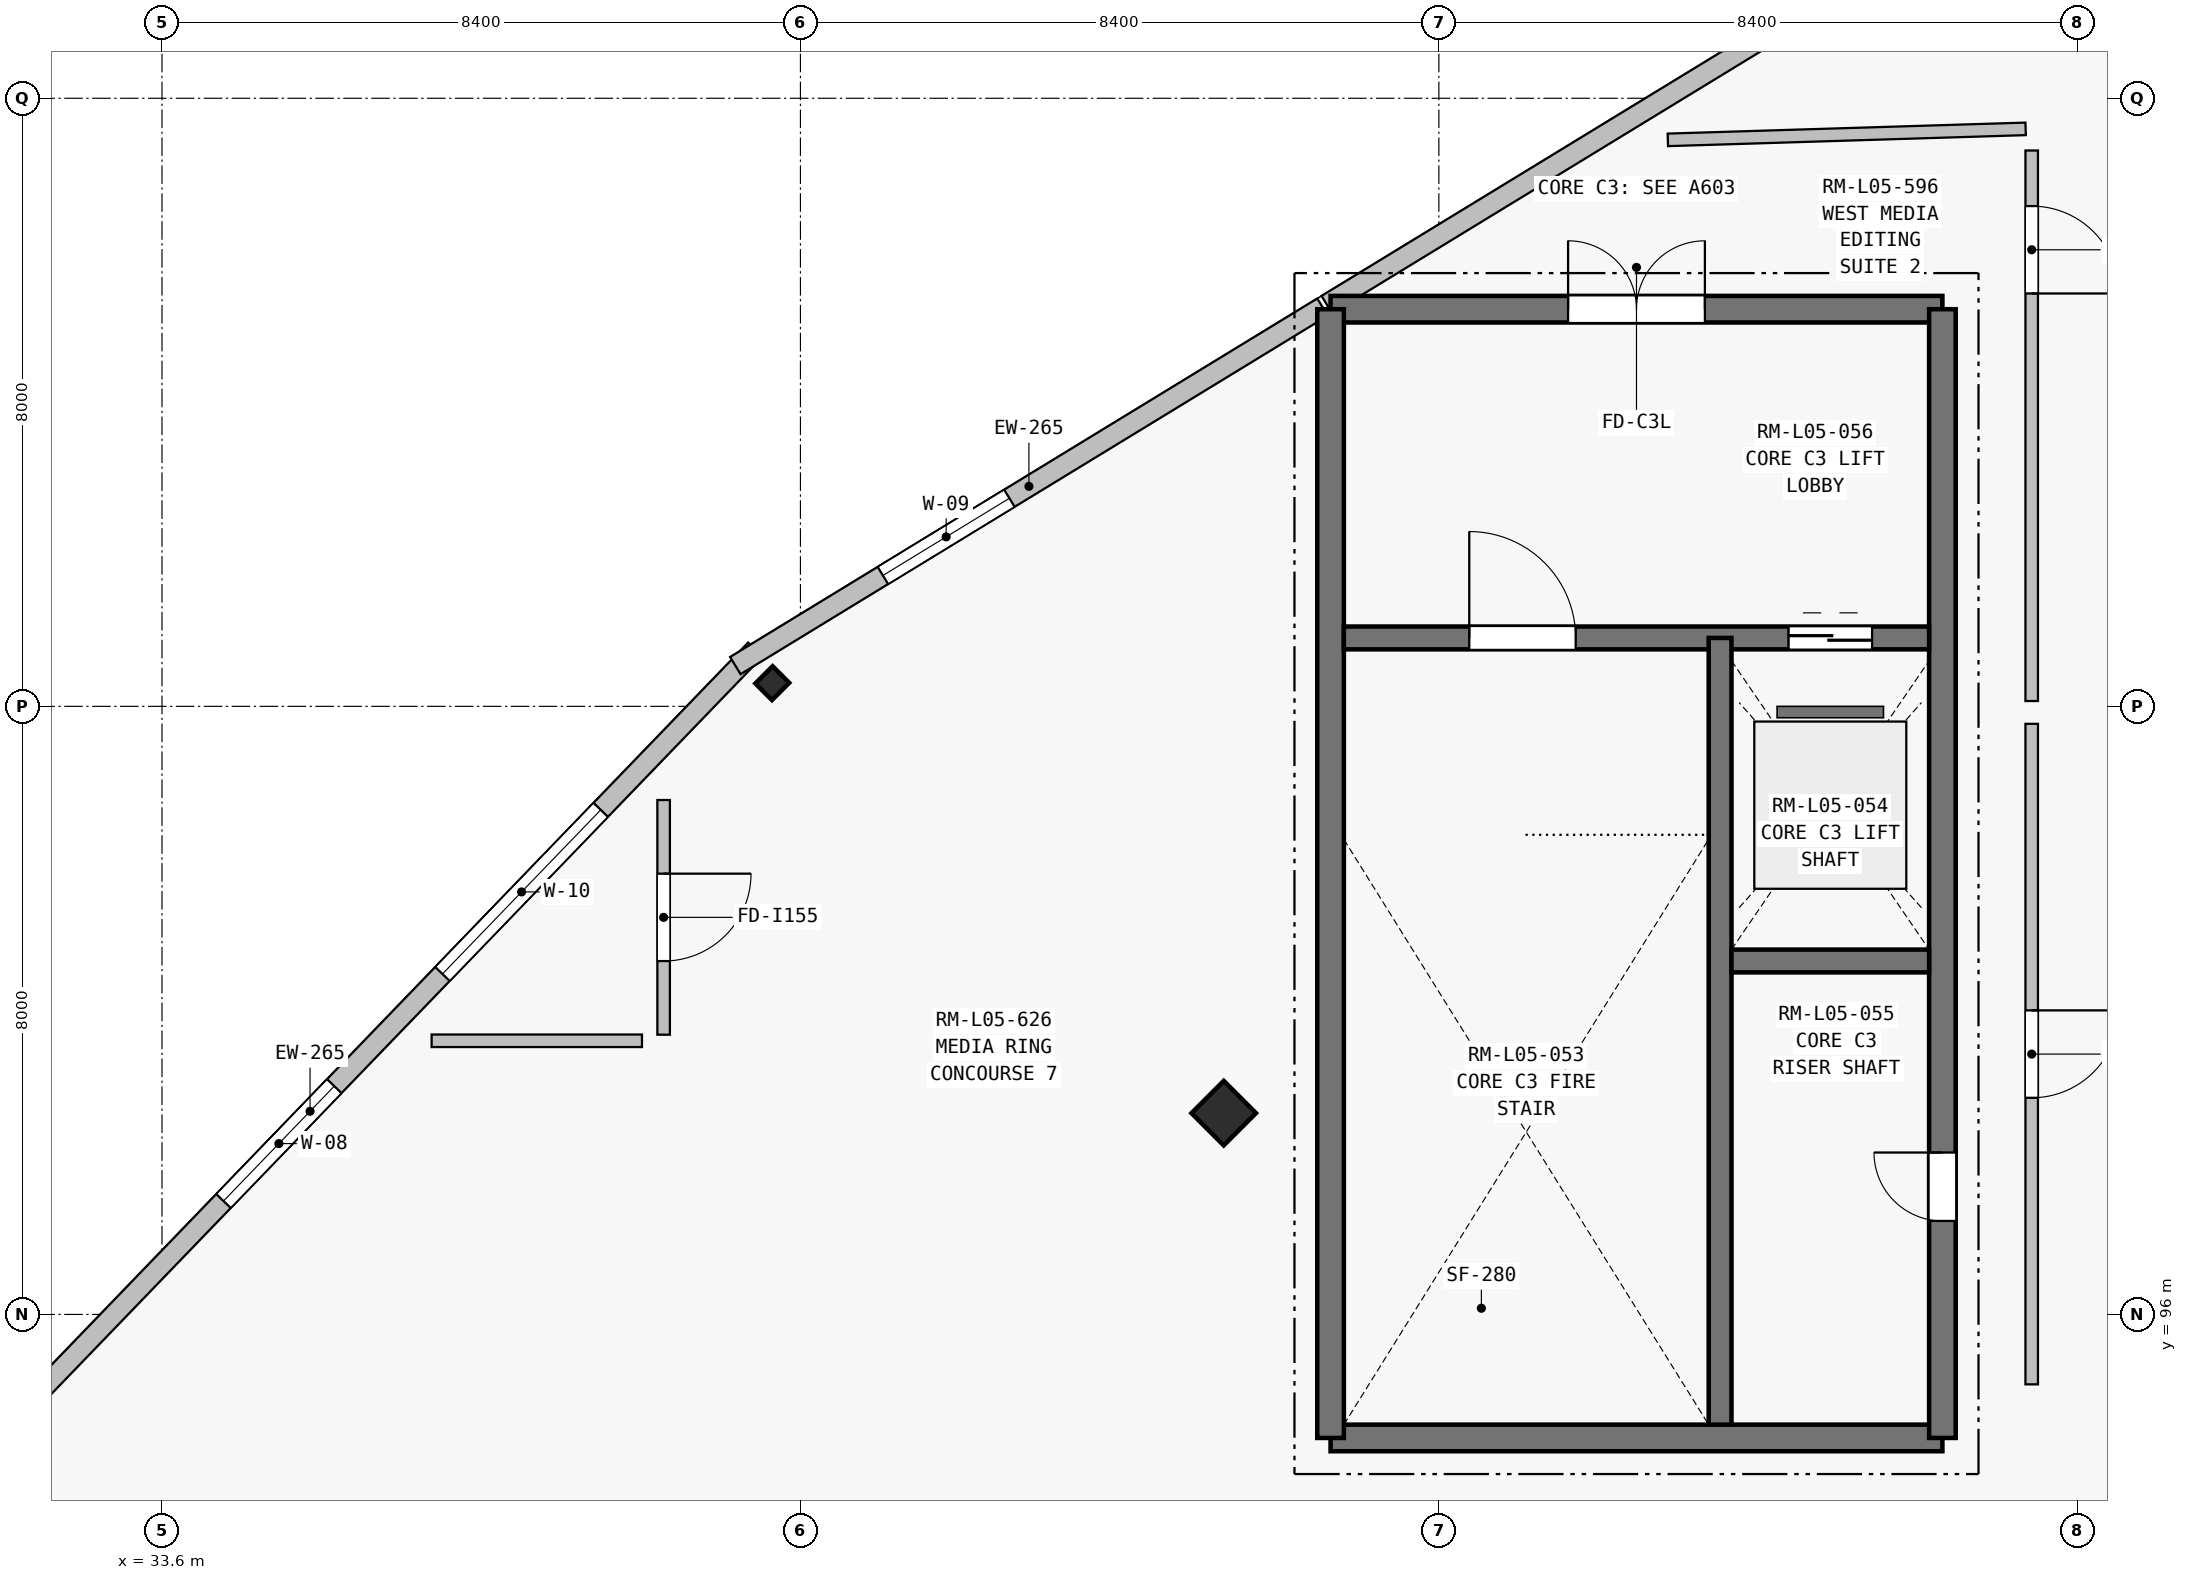
"""IFC4 building model, lengths in metres.
Left out: names, types, materials, properties, quantities, classifications, styles, units other than length and angle.
Written with IfcOpenShell. Run it as: python <this file> out.ifc"""

import sys

from ifc_helpers import new_model, si_unit, direction, frame, frame_2d, origin, origin_2d, place, context, subcontext, project, spatial, rectangle, i_section, extrude, element, fill, save


model = new_model("IFC4")
c1 = context("Model", 3, precision=1e-05, world=origin(), true_north=direction((0.0, 1.0)))
c2 = subcontext(c1, "Body", "Model", "MODEL_VIEW")
j1 = project(units=[si_unit("LENGTHUNIT", "METRE"), si_unit("PLANEANGLEUNIT", "RADIAN")], contexts=[c1])
p1 = place(None, origin())
s1 = spatial("IfcSite", under=j1, at=p1, CompositionType="ELEMENT")
p2 = place(p1, origin())
s2 = spatial("IfcBuilding", under=s1, at=p2, CompositionType="ELEMENT")
p3 = place(p2, frame((0.0, 0.0, 23.4)))
s3 = spatial("IfcBuildingStorey", under=s2, at=p3, CompositionType="ELEMENT", Elevation=23.4)
p4 = place(p3, frame((47.569, 98.648, 0.0), z_axis=(0.0, 0.0, 1.0), x_axis=(-0.707106781187, 0.707106781187, 0.0)))
e1 = element("IfcColumn", 1, at=p4, inside=s3, PredefinedType="COLUMN", context=c2, shape_type="SweptSolid", body=[
    extrude(rectangle(XDim=0.6, YDim=0.6, at=origin_2d()), origin(), (0.0, 0.0, 1.0), 3.15),
])
p5 = place(p3, frame((41.63, 104.305, 0.0), z_axis=(0.0, 0.0, 1.0), x_axis=(-0.707106781187, 0.707106781187, 0.0)))
e2 = element("IfcColumn", 2, at=p5, inside=s3, PredefinedType="COLUMN", context=c2, shape_type="SweptSolid", body=[
    extrude(i_section(OverallWidth=0.309, OverallDepth=0.321, WebThickness=0.014, FlangeThickness=0.022, at=origin_2d()), origin(), (0.0, 0.0, 1.0), 3.32),
])
p6 = place(p3, frame((29.688, 92.597, 0.0), z_axis=(0.0, 0.0, 1.0), x_axis=(0.694213985366, 0.719768672924, 0.0)))
e3 = element("IfcWall", 3, at=p6, inside=s3, PredefinedType="SOLIDWALL", context=c2, shape_type="SweptSolid", body=[
    extrude(rectangle(XDim=16.881, YDim=0.265, at=frame_2d((8.441, 0.0))), origin(), (0.0, 0.0, 1.0), 3.18),
])
p7 = place(p6, frame((6.8, 0.0, 0.9)))
e4 = element("IfcOpeningElement", 4, at=p7, cuts=e3, PredefinedType="OPENING", context=c2, shape_type="SweptSolid", body=[
    extrude(rectangle(XDim=2.1, YDim=2.0, at=frame_2d((1.05, 1.0))), frame((0.0, 0.142, 0.0), z_axis=(0.0, -1.0, 0.0), x_axis=(1.0, 0.0, 0.0)), (0.0, 0.0, 1.0), 0.285),
])
p8 = place(p6, frame((10.95, 0.0, 0.9)))
e5 = element("IfcOpeningElement", 5, at=p8, cuts=e3, PredefinedType="OPENING", context=c2, shape_type="SweptSolid", body=[
    extrude(rectangle(XDim=3.0, YDim=1.6, at=frame_2d((1.5, 0.8))), frame((0.0, 0.142, 0.0), z_axis=(0.0, -1.0, 0.0), x_axis=(1.0, 0.0, 0.0)), (0.0, 0.0, 1.0), 0.285),
])
p9 = place(p3, frame((41.143, 104.536, 0.0), z_axis=(0.0, 0.0, 1.0), x_axis=(0.853521769318, 0.52105718429, 0.0)))
e6 = element("IfcWall", 6, at=p9, inside=s3, PredefinedType="SOLIDWALL", context=c2, shape_type="SweptSolid", body=[
    extrude(rectangle(XDim=9.052, YDim=0.265, at=frame_2d((4.526, 0.0))), origin(), (0.0, 0.0, 1.0), 3.18),
])
p10 = place(p9, frame((2.275, 0.0, 0.9)))
e7 = element("IfcOpeningElement", 7, at=p10, cuts=e6, PredefinedType="OPENING", context=c2, shape_type="SweptSolid", body=[
    extrude(rectangle(XDim=1.95, YDim=2.0, at=frame_2d((0.975, 1.0))), frame((0.0, 0.142, 0.0), z_axis=(0.0, -1.0, 0.0), x_axis=(1.0, 0.0, 0.0)), (0.0, 0.0, 1.0), 0.285),
])
p11 = place(p3, frame((48.925, 109.287, 0.0), z_axis=(0.0, 0.0, 1.0), x_axis=(0.853522240257, 0.521056412864, 0.0)))
e8 = element("IfcWall", 8, at=p11, inside=s3, PredefinedType="SOLIDWALL", context=c2, shape_type="SweptSolid", body=[
    extrude(rectangle(XDim=8.758, YDim=0.265, at=frame_2d((4.379, 0.0))), origin(), (0.0, 0.0, 1.0), 3.18),
])
p12 = place(p3, frame((48.975, 94.375, 0.0), z_axis=(0.0, 0.0, 1.0), x_axis=(1.0, 0.0, 0.0)))
e9 = element("IfcWall", 9, at=p12, inside=s3, PredefinedType="SHEAR", context=c2, shape_type="SweptSolid", body=[
    extrude(rectangle(XDim=8.05, YDim=0.35, at=frame_2d((4.025, 0.0))), origin(), (0.0, 0.0, 1.0), 3.08),
])
p13 = place(p3, frame((48.975, 109.225, 0.0), z_axis=(0.0, 0.0, 1.0), x_axis=(1.0, 0.0, 0.0)))
e10 = element("IfcWall", 10, at=p13, inside=s3, PredefinedType="SHEAR", context=c2, shape_type="SweptSolid", body=[
    extrude(rectangle(XDim=8.05, YDim=0.35, at=frame_2d((4.025, 0.0))), origin(), (0.0, 0.0, 1.0), 3.08),
])
p14 = place(p13, frame((3.125, 0.0, 0.0)))
e11 = element("IfcOpeningElement", 11, at=p14, cuts=e10, PredefinedType="OPENING", context=c2, shape_type="SweptSolid", body=[
    extrude(rectangle(XDim=1.8, YDim=2.25, at=frame_2d((0.9, 1.125))), frame((0.0, 0.185, 0.0), z_axis=(0.0, -1.0, 0.0), x_axis=(1.0, 0.0, 0.0)), (0.0, 0.0, 1.0), 0.37),
])
p15 = place(p3, frame((48.975, 94.375, 0.0), z_axis=(0.0, 0.0, 1.0), x_axis=(0.0, 1.0, 0.0)))
e12 = element("IfcWall", 12, at=p15, inside=s3, PredefinedType="SHEAR", context=c2, shape_type="SweptSolid", body=[
    extrude(rectangle(XDim=14.85, YDim=0.35, at=frame_2d((7.425, 0.0))), origin(), (0.0, 0.0, 1.0), 3.08),
])
p16 = place(p3, frame((57.025, 94.375, 0.0), z_axis=(0.0, 0.0, 1.0), x_axis=(0.0, 1.0, 0.0)))
e13 = element("IfcWall", 13, at=p16, inside=s3, PredefinedType="SHEAR", context=c2, shape_type="SweptSolid", body=[
    extrude(rectangle(XDim=14.85, YDim=0.35, at=frame_2d((7.425, 0.0))), origin(), (0.0, 0.0, 1.0), 3.08),
])
p17 = place(p16, frame((2.855, 0.0, 0.0)))
e14 = element("IfcOpeningElement", 14, at=p17, cuts=e13, PredefinedType="OPENING", context=c2, shape_type="SweptSolid", body=[
    extrude(rectangle(XDim=0.9, YDim=2.1, at=frame_2d((0.45, 1.05))), frame((0.0, 0.185, 0.0), z_axis=(0.0, -1.0, 0.0), x_axis=(1.0, 0.0, 0.0)), (0.0, 0.0, 1.0), 0.37),
])
p18 = place(p3, frame((49.15, 104.9, 0.0), z_axis=(0.0, 0.0, 1.0), x_axis=(1.0, 0.0, 0.0)))
e15 = element("IfcWall", 15, at=p18, inside=s3, PredefinedType="SHEAR", context=c2, shape_type="SweptSolid", body=[
    extrude(rectangle(XDim=7.7, YDim=0.3, at=frame_2d((3.85, 0.0))), origin(), (0.0, 0.0, 1.0), 3.08),
])
p19 = place(p18, frame((1.65, 0.0, 0.0)))
e16 = element("IfcOpeningElement", 16, at=p19, cuts=e15, PredefinedType="OPENING", context=c2, shape_type="SweptSolid", body=[
    extrude(rectangle(XDim=1.4, YDim=2.2, at=frame_2d((0.7, 1.1))), frame((0.0, 0.16, 0.0), z_axis=(0.0, -1.0, 0.0), x_axis=(1.0, 0.0, 0.0)), (0.0, 0.0, 1.0), 0.32),
])
p20 = place(p18, frame((5.85, 0.0, 0.0)))
e17 = element("IfcOpeningElement", 17, at=p20, cuts=e15, PredefinedType="OPENING", context=c2, shape_type="SweptSolid", body=[
    extrude(rectangle(XDim=1.1, YDim=2.2, at=frame_2d((0.55, 1.1))), frame((0.0, 0.16, 0.0), z_axis=(0.0, -1.0, 0.0), x_axis=(1.0, 0.0, 0.0)), (0.0, 0.0, 1.0), 0.32),
])
p21 = place(p3, frame((54.1, 94.55, 0.0), z_axis=(0.0, 0.0, 1.0), x_axis=(0.0, 1.0, 0.0)))
e18 = element("IfcWall", 18, at=p21, inside=s3, PredefinedType="SHEAR", context=c2, shape_type="SweptSolid", body=[
    extrude(rectangle(XDim=10.35, YDim=0.3, at=frame_2d((5.175, 0.0))), origin(), (0.0, 0.0, 1.0), 3.08),
])
p22 = place(p3, frame((54.25, 100.65, 0.0), z_axis=(0.0, 0.0, 1.0), x_axis=(1.0, 0.0, 0.0)))
e19 = element("IfcWall", 19, at=p22, inside=s3, PredefinedType="SHEAR", context=c2, shape_type="SweptSolid", body=[
    extrude(rectangle(XDim=2.6, YDim=0.3, at=frame_2d((1.3, 0.0))), origin(), (0.0, 0.0, 1.0), 3.08),
])
p23 = place(p3, frame((58.2, 103.77, 0.0), z_axis=(0.0, 0.0, 1.0), x_axis=(0.0, -1.0, 0.0)))
e20 = element("IfcWall", 20, at=p23, inside=s3, PredefinedType="PARTITIONING", context=c2, shape_type="SweptSolid", body=[
    extrude(rectangle(XDim=8.69, YDim=0.165, at=frame_2d((4.345, 0.0))), origin(), (0.0, 0.0, 1.0), 2.445),
])
p24 = place(p23, frame((3.77, 0.0, 0.0)))
e21 = element("IfcOpeningElement", 21, at=p24, cuts=e20, PredefinedType="OPENING", context=c2, shape_type="SweptSolid", body=[
    extrude(rectangle(XDim=1.15, YDim=2.2, at=frame_2d((0.575, 1.1))), frame((0.0, 0.093, 0.0), z_axis=(0.0, -1.0, 0.0), x_axis=(1.0, 0.0, 0.0)), (0.0, 0.0, 1.0), 0.185),
])
p25 = place(p3, frame((53.413, 111.453, 0.0), z_axis=(0.0, 0.0, 1.0), x_axis=(0.99952742875, 0.030739537665, 0.0)))
e22 = element("IfcWall", 22, at=p25, inside=s3, PredefinedType="PARTITIONING", context=c2, shape_type="SweptSolid", body=[
    extrude(rectangle(XDim=4.71, YDim=0.165, at=frame_2d((2.355, 0.0))), origin(), (0.0, 0.0, 1.0), 2.5),
])
p26 = place(p3, frame((58.2, 111.313, 0.0), z_axis=(0.0, 0.0, 1.0), x_axis=(0.0, -1.0, 0.0)))
e23 = element("IfcWall", 23, at=p26, inside=s3, PredefinedType="PARTITIONING", context=c2, shape_type="SweptSolid", body=[
    extrude(rectangle(XDim=7.243, YDim=0.165, at=frame_2d((3.621, 0.0))), origin(), (0.0, 0.0, 1.0), 3.18),
])
p27 = place(p26, frame((0.731, 0.0, 0.0)))
e24 = element("IfcOpeningElement", 24, at=p27, cuts=e23, PredefinedType="OPENING", context=c2, shape_type="SweptSolid", body=[
    extrude(rectangle(XDim=1.15, YDim=2.2, at=frame_2d((0.575, 1.1))), frame((0.0, 0.093, 0.0), z_axis=(0.0, -1.0, 0.0), x_axis=(1.0, 0.0, 0.0)), (0.0, 0.0, 1.0), 0.185),
])
p28 = place(p3, frame((40.2, 102.768, 0.0), z_axis=(0.0, 0.0, 1.0), x_axis=(0.0, -1.0, 0.0)))
e25 = element("IfcWall", 25, at=p28, inside=s3, PredefinedType="PARTITIONING", context=c2, shape_type="SweptSolid", body=[
    extrude(rectangle(XDim=3.088, YDim=0.165, at=frame_2d((1.544, 0.0))), origin(), (0.0, 0.0, 1.0), 2.5),
])
p29 = place(p28, frame((0.969, 0.0, 0.0)))
e26 = element("IfcOpeningElement", 26, at=p29, cuts=e25, PredefinedType="OPENING", context=c2, shape_type="SweptSolid", body=[
    extrude(rectangle(XDim=1.15, YDim=2.2, at=frame_2d((0.575, 1.1))), frame((0.0, 0.093, 0.0), z_axis=(0.0, -1.0, 0.0), x_axis=(1.0, 0.0, 0.0)), (0.0, 0.0, 1.0), 0.185),
])
p30 = place(p3, frame((39.915, 99.6, 0.0), z_axis=(0.0, 0.0, 1.0), x_axis=(-1.0, 0.0, 0.0)))
e27 = element("IfcWall", 27, at=p30, inside=s3, PredefinedType="PARTITIONING", context=c2, shape_type="SweptSolid", body=[
    extrude(rectangle(XDim=2.768, YDim=0.165, at=frame_2d((1.384, 0.0))), origin(), (0.0, 0.0, 1.0), 2.5),
])
p31 = place(p7, origin())
e28 = element("IfcWindow", 28, at=p31, inside=s3, PartitioningType="SINGLE_PANEL", PredefinedType="WINDOW", context=c2, shape_type="SweptSolid", body=[
    extrude(rectangle(XDim=2.1, YDim=2.0, at=frame_2d((1.05, 1.0))), frame((0.0, 0.03, 0.0), z_axis=(0.0, -1.0, 0.0), x_axis=(1.0, 0.0, 0.0)), (0.0, 0.0, 1.0), 0.06),
])
fill(e4, e28)
p32 = place(p8, origin())
e29 = element("IfcWindow", 29, at=p32, inside=s3, PartitioningType="SINGLE_PANEL", PredefinedType="WINDOW", context=c2, shape_type="SweptSolid", body=[
    extrude(rectangle(XDim=3.0, YDim=1.6, at=frame_2d((1.5, 0.8))), frame((0.0, 0.03, 0.0), z_axis=(0.0, -1.0, 0.0), x_axis=(1.0, 0.0, 0.0)), (0.0, 0.0, 1.0), 0.06),
])
fill(e5, e29)
p33 = place(p10, origin())
e30 = element("IfcWindow", 30, at=p33, inside=s3, PartitioningType="SINGLE_PANEL", PredefinedType="WINDOW", context=c2, shape_type="SweptSolid", body=[
    extrude(rectangle(XDim=1.95, YDim=2.0, at=frame_2d((0.975, 1.0))), frame((0.0, 0.03, 0.0), z_axis=(0.0, -1.0, 0.0), x_axis=(1.0, 0.0, 0.0)), (0.0, 0.0, 1.0), 0.06),
])
fill(e7, e30)
p34 = place(p14, origin())
e31 = element("IfcDoor", 31, at=p34, inside=s3, OperationType="DOUBLE_DOOR_SINGLE_SWING", PredefinedType="DOOR", context=c2, shape_type="SweptSolid", body=[
    extrude(rectangle(XDim=1.8, YDim=2.25, at=frame_2d((0.9, 1.125))), frame((0.0, 0.025, 0.0), z_axis=(0.0, -1.0, 0.0), x_axis=(1.0, 0.0, 0.0)), (0.0, 0.0, 1.0), 0.05),
])
fill(e11, e31)
p35 = place(p19, origin())
e32 = element("IfcDoor", 32, at=p35, inside=s3, OperationType="SINGLE_SWING_LEFT", PredefinedType="DOOR", context=c2, shape_type="SweptSolid", body=[
    extrude(rectangle(XDim=1.4, YDim=2.2, at=frame_2d((0.7, 1.1))), frame((0.0, 0.025, 0.0), z_axis=(0.0, -1.0, 0.0), x_axis=(1.0, 0.0, 0.0)), (0.0, 0.0, 1.0), 0.05),
])
fill(e16, e32)
p36 = place(p17, origin())
e33 = element("IfcDoor", 33, at=p36, inside=s3, OperationType="SINGLE_SWING_RIGHT", PredefinedType="DOOR", context=c2, shape_type="SweptSolid", body=[
    extrude(rectangle(XDim=0.9, YDim=2.1, at=frame_2d((0.45, 1.05))), frame((0.0, 0.025, 0.0), z_axis=(0.0, -1.0, 0.0), x_axis=(1.0, 0.0, 0.0)), (0.0, 0.0, 1.0), 0.05),
])
fill(e14, e33)
p37 = place(p20, origin())
e34 = element("IfcDoor", 34, at=p37, inside=s3, OperationType="SLIDING_TO_LEFT", PredefinedType="DOOR", context=c2, shape_type="SweptSolid", body=[
    extrude(rectangle(XDim=1.1, YDim=2.2, at=frame_2d((0.55, 1.1))), frame((0.0, 0.025, 0.0), z_axis=(0.0, -1.0, 0.0), x_axis=(1.0, 0.0, 0.0)), (0.0, 0.0, 1.0), 0.05),
])
fill(e17, e34)
p38 = place(p24, origin())
e35 = element("IfcDoor", 35, at=p38, inside=s3, OperationType="SINGLE_SWING_LEFT", PredefinedType="DOOR", context=c2, shape_type="SweptSolid", body=[
    extrude(rectangle(XDim=1.15, YDim=2.2, at=frame_2d((0.575, 1.1))), frame((0.0, 0.025, 0.0), z_axis=(0.0, -1.0, 0.0), x_axis=(1.0, 0.0, 0.0)), (0.0, 0.0, 1.0), 0.05),
])
fill(e21, e35)
p39 = place(p27, origin())
e36 = element("IfcDoor", 36, at=p39, inside=s3, OperationType="SINGLE_SWING_RIGHT", PredefinedType="DOOR", context=c2, shape_type="SweptSolid", body=[
    extrude(rectangle(XDim=1.15, YDim=2.2, at=frame_2d((0.575, 1.1))), frame((0.0, 0.025, 0.0), z_axis=(0.0, -1.0, 0.0), x_axis=(1.0, 0.0, 0.0)), (0.0, 0.0, 1.0), 0.05),
])
fill(e24, e36)
p40 = place(p29, origin())
e37 = element("IfcDoor", 37, at=p40, inside=s3, OperationType="SINGLE_SWING_LEFT", PredefinedType="DOOR", context=c2, shape_type="SweptSolid", body=[
    extrude(rectangle(XDim=1.15, YDim=2.2, at=frame_2d((0.575, 1.1))), frame((0.0, 0.025, 0.0), z_axis=(0.0, -1.0, 0.0), x_axis=(1.0, 0.0, 0.0)), (0.0, 0.0, 1.0), 0.05),
])
fill(e26, e37)
save(model, sys.argv[1])
